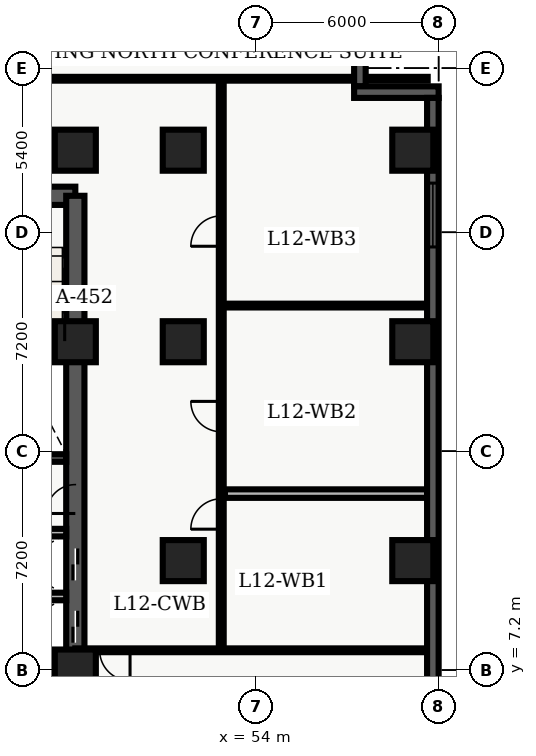
"""IFC4 building model, lengths in metres.
Left out: names, types, materials, properties, quantities, classifications, styles, units other than length and angle.
Written with IfcOpenShell. Run it as: python <this file> out.ifc"""

import sys

from ifc_helpers import new_model, entity, si_unit, converted_unit, direction, frame, origin_with_axes, origin_2d_with_axis, place, context, subcontext, project, spatial, polyline, rectangle, outline, extrude, element, fill, save


model = new_model("IFC4")
c1 = context("Model", 3, precision=1e-05, world=origin_with_axes(), true_north=direction((0.0, 1.0)))
c2 = subcontext(c1, "Body", "Model", "MODEL_VIEW")
j1 = project(units=[si_unit("LENGTHUNIT", "METRE"), converted_unit("PLANEANGLEUNIT", "DEGREE", entity("IfcPlaneAngleMeasure", 0.017), si_unit("PLANEANGLEUNIT", "RADIAN"), dimensions=[0, 0, 0, 0, 0, 0, 0])], contexts=[c1])
p1 = place(None, origin_with_axes())
s1 = spatial("IfcSite", under=j1, at=p1, CompositionType="ELEMENT")
p2 = place(p1, origin_with_axes())
s2 = spatial("IfcBuilding", under=s1, at=p2, CompositionType="ELEMENT")
p3 = place(p2, frame((0.0, 0.0, 52.2), z_axis=(0.0, 0.0, 1.0), x_axis=(1.0, 0.0, 0.0)))
s3 = spatial("IfcBuildingStorey", under=s2, at=p3, CompositionType="ELEMENT", Elevation=52.2)
p4 = place(p3, frame((40.2, 7.2, 0.0), z_axis=(0.0, 0.0, 1.0), x_axis=(1.0, 0.0, 0.0)))
e1 = element("IfcWall", 1, at=p4, inside=s3, PredefinedType="SHEAR", context=c2, shape_type="SweptSolid", body=[
    extrude(outline(polyline([(0.0, -0.3), (7.85, -0.3), (7.85, 0.3), (0.0, 0.3), (0.0, -0.3)])), origin_with_axes(), (0.0, 0.0, 1.0), 3.66),
])
p5 = place(p4, frame((2.175, 0.0, 0.0), z_axis=(0.0, 0.0, 1.0), x_axis=(1.0, 0.0, 0.0)))
e2 = element("IfcOpeningElement", 2, at=p5, cuts=e1, PredefinedType="OPENING", context=c2, shape_type="SweptSolid", body=[
    extrude(rectangle(XDim=1.05, YDim=0.62, at=origin_2d_with_axis()), origin_with_axes(), (0.0, 0.0, 1.0), 2.15),
])
p6 = place(p3, frame((40.2, 22.8, 0.0), z_axis=(0.0, 0.0, 1.0), x_axis=(1.0, 0.0, 0.0)))
e3 = element("IfcWall", 3, at=p6, inside=s3, PredefinedType="SHEAR", context=c2, shape_type="SweptSolid", body=[
    extrude(outline(polyline([(0.0, -0.3), (7.85, -0.3), (7.85, 0.3), (0.0, 0.3), (0.0, -0.3)])), origin_with_axes(), (0.0, 0.0, 1.0), 3.66),
])
p7 = place(p6, frame((5.775, 0.0, 0.0), z_axis=(0.0, 0.0, 1.0), x_axis=(1.0, 0.0, 0.0)))
e4 = element("IfcOpeningElement", 4, at=p7, cuts=e3, PredefinedType="OPENING", context=c2, shape_type="SweptSolid", body=[
    extrude(rectangle(XDim=1.05, YDim=0.62, at=origin_2d_with_axis()), origin_with_axes(), (0.0, 0.0, 1.0), 2.15),
])
p8 = place(p6, frame((2.15, 0.0, 0.0), z_axis=(0.0, 0.0, 1.0), x_axis=(1.0, 0.0, 0.0)))
e5 = element("IfcOpeningElement", 5, at=p8, cuts=e3, PredefinedType="OPENING", context=c2, shape_type="SweptSolid", body=[
    extrude(rectangle(XDim=0.9, YDim=0.62, at=origin_2d_with_axis()), origin_with_axes(), (0.0, 0.0, 1.0), 2.15),
])
p9 = place(p3, frame((48.05, 7.2, 0.0), z_axis=(0.0, 0.0, 1.0), x_axis=(0.0, 1.0, 0.0)))
e6 = element("IfcWall", 6, at=p9, inside=s3, PredefinedType="SHEAR", context=c2, shape_type="SweptSolid", body=[
    extrude(outline(polyline([(0.0, -0.3), (15.6, -0.3), (15.6, 0.3), (0.0, 0.3), (0.0, -0.3)])), origin_with_axes(), (0.0, 0.0, 1.0), 3.66),
])
p10 = place(p9, frame((1.425, 0.0, 0.0), z_axis=(0.0, 0.0, 1.0), x_axis=(1.0, 0.0, 0.0)))
e7 = element("IfcOpeningElement", 7, at=p10, cuts=e6, PredefinedType="OPENING", context=c2, shape_type="SweptSolid", body=[
    extrude(rectangle(XDim=1.05, YDim=0.62, at=origin_2d_with_axis()), origin_with_axes(), (0.0, 0.0, 1.0), 2.15),
])
p11 = place(p9, frame((3.475, 0.0, 0.0), z_axis=(0.0, 0.0, 1.0), x_axis=(1.0, 0.0, 0.0)))
e8 = element("IfcOpeningElement", 8, at=p11, cuts=e6, PredefinedType="OPENING", context=c2, shape_type="SweptSolid", body=[
    extrude(rectangle(XDim=1.05, YDim=0.62, at=origin_2d_with_axis()), origin_with_axes(), (0.0, 0.0, 1.0), 2.15),
])
p12 = place(p9, frame((5.625, 0.0, 0.0), z_axis=(0.0, 0.0, 1.0), x_axis=(1.0, 0.0, 0.0)))
e9 = element("IfcOpeningElement", 9, at=p12, cuts=e6, PredefinedType="OPENING", context=c2, shape_type="SweptSolid", body=[
    extrude(rectangle(XDim=0.95, YDim=0.62, at=origin_2d_with_axis()), origin_with_axes(), (0.0, 0.0, 1.0), 2.15),
])
p13 = place(p3, frame((44.25, 14.175, 0.0), z_axis=(0.0, 0.0, 1.0), x_axis=(1.0, 0.0, 0.0)))
e10 = element("IfcWall", 10, at=p13, inside=s3, PredefinedType="SHEAR", context=c2, shape_type="SweptSolid", body=[
    extrude(outline(polyline([(0.0, -0.125), (3.5, -0.125), (3.5, 0.125), (0.0, 0.125), (0.0, -0.125)])), origin_with_axes(), (0.0, 0.0, 1.0), 3.66),
])
for number, where, z_axis, x_axis in (
    (11, (48.05, 7.2, 0.0), (0.0, 0.0, 1.0), (1.0, 0.0, 0.0)),
    (12, (48.05, 18.0, 0.0), (0.0, 0.0, 1.0), (1.0, 0.0, 0.0)),
    (13, (48.05, 24.3, 0.0), (0.0, 0.0, 1.0), (1.0, 0.0, 0.0)),
    (14, (51.6, 10.8, 0.0), (0.0, 0.0, 1.0), (1.0, 0.0, 0.0)),
    (15, (51.6, 18.0, 0.0), (0.0, 0.0, 1.0), (1.0, 0.0, 0.0)),
    (16, (51.6, 24.3, 0.0), (0.0, 0.0, 1.0), (1.0, 0.0, 0.0)),
    (17, (59.15, 10.8, 0.0), (0.0, 0.0, 1.0), (1.0, 0.0, 0.0)),
    (18, (59.15, 18.0, 0.0), (0.0, 0.0, 1.0), (1.0, 0.0, 0.0)),
    (19, (59.15, 24.3, 0.0), (0.0, 0.0, 1.0), (1.0, 0.0, 0.0)),
):
    element("IfcColumn", number, at=place(p3, frame(where, z_axis=z_axis, x_axis=x_axis)), inside=s3, PredefinedType="COLUMN", context=c2, shape_type="SweptSolid", body=[
        extrude(rectangle(XDim=1.35, YDim=1.35, at=origin_2d_with_axis()), origin_with_axes(), (0.0, 0.0, 1.0), 3.9),
    ])
for number, where, z_axis, x_axis in (
    (20, (44.25, 9.62, 0.0), (0.0, 0.0, 1.0), (1.0, 0.0, 0.0)),
    (21, (44.25, 11.72, 0.0), (0.0, 0.0, 1.0), (1.0, 0.0, 0.0)),
):
    element("IfcWall", number, at=place(p3, frame(where, z_axis=z_axis, x_axis=x_axis)), inside=s3, PredefinedType="SOLIDWALL", context=c2, shape_type="SweptSolid", body=[
        extrude(outline(polyline([(0.0, -0.125), (3.5, -0.125), (3.5, 0.125), (0.0, 0.125), (0.0, -0.125)])), origin_with_axes(), (0.0, 0.0, 1.0), 2.7),
    ])
p14 = place(p3, frame((52.85, 7.85, 0.0), z_axis=(0.0, 0.0, 1.0), x_axis=(0.0, 1.0, 0.0)))
e22 = element("IfcWall", 22, at=p14, inside=s3, PredefinedType="PARTITIONING", context=c2, shape_type="SweptSolid", body=[
    extrude(outline(polyline([(0.0, -0.08), (18.8, -0.08), (18.8, 0.08), (0.0, 0.08), (0.0, -0.08)])), origin_with_axes(), (0.0, 0.0, 1.0), 2.7),
])
p15 = place(p14, frame((4.484, 0.0, 0.0), z_axis=(0.0, 0.0, 1.0), x_axis=(1.0, 0.0, 0.0)))
e23 = element("IfcOpeningElement", 23, at=p15, cuts=e22, PredefinedType="OPENING", context=c2, shape_type="SweptSolid", body=[
    extrude(rectangle(XDim=1.0, YDim=0.18, at=origin_2d_with_axis()), origin_with_axes(), (0.0, 0.0, 1.0), 2.15),
])
p16 = place(p14, frame((7.687, 0.0, 0.0), z_axis=(0.0, 0.0, 1.0), x_axis=(1.0, 0.0, 0.0)))
e24 = element("IfcOpeningElement", 24, at=p16, cuts=e22, PredefinedType="OPENING", context=c2, shape_type="SweptSolid", body=[
    extrude(rectangle(XDim=1.0, YDim=0.18, at=origin_2d_with_axis()), origin_with_axes(), (0.0, 0.0, 1.0), 2.15),
])
p17 = place(p14, frame((13.79, 0.0, 0.0), z_axis=(0.0, 0.0, 1.0), x_axis=(1.0, 0.0, 0.0)))
e25 = element("IfcOpeningElement", 25, at=p17, cuts=e22, PredefinedType="OPENING", context=c2, shape_type="SweptSolid", body=[
    extrude(rectangle(XDim=1.0, YDim=0.18, at=origin_2d_with_axis()), origin_with_axes(), (0.0, 0.0, 1.0), 2.15),
])
p18 = place(p3, frame((59.64, 7.85, 0.0), z_axis=(0.0, 0.0, 1.0), x_axis=(-1.0, 0.0, 0.0)))
e26 = element("IfcWall", 26, at=p18, inside=s3, PredefinedType="PARTITIONING", context=c2, shape_type="SweptSolid", body=[
    extrude(outline(polyline([(0.0, -0.062), (11.59, -0.062), (11.59, 0.062), (0.0, 0.062), (0.0, -0.062)])), origin_with_axes(), (0.0, 0.0, 1.0), 2.7),
])
p19 = place(p18, frame((10.29, 0.0, 0.0), z_axis=(0.0, 0.0, 1.0), x_axis=(1.0, 0.0, 0.0)))
e27 = element("IfcOpeningElement", 27, at=p19, cuts=e26, PredefinedType="OPENING", context=c2, shape_type="SweptSolid", body=[
    extrude(rectangle(XDim=1.0, YDim=0.145, at=origin_2d_with_axis()), origin_with_axes(), (0.0, 0.0, 1.0), 2.15),
])
p20 = place(p3, frame((38.76, 26.65, 0.0), z_axis=(0.0, 0.0, 1.0), x_axis=(1.0, 0.0, 0.0)))
e28 = element("IfcWall", 28, at=p20, inside=s3, PredefinedType="PARTITIONING", context=c2, shape_type="SweptSolid", body=[
    extrude(outline(polyline([(0.0, -0.062), (20.88, -0.062), (20.88, 0.062), (0.0, 0.062), (0.0, -0.062)])), origin_with_axes(), (0.0, 0.0, 1.0), 2.7),
])
p21 = place(p20, frame((4.24, 0.0, 0.0), z_axis=(0.0, 0.0, 1.0), x_axis=(1.0, 0.0, 0.0)))
e29 = element("IfcOpeningElement", 29, at=p21, cuts=e28, PredefinedType="OPENING", context=c2, shape_type="SweptSolid", body=[
    extrude(rectangle(XDim=1.0, YDim=0.145, at=origin_2d_with_axis()), origin_with_axes(), (0.0, 0.0, 1.0), 2.15),
])
p22 = place(p3, frame((52.97, 13.004, 0.0), z_axis=(0.0, 0.0, 1.0), x_axis=(1.0, 0.0, 0.0)))
e30 = element("IfcWall", 30, at=p22, inside=s3, PredefinedType="PARTITIONING", context=c2, shape_type="SweptSolid", body=[
    extrude(outline(polyline([(0.0, -0.14), (6.655, -0.14), (6.655, 0.14), (0.0, 0.14), (0.0, -0.14)])), origin_with_axes(), (0.0, 0.0, 1.0), 2.7),
])
p23 = place(p3, frame((52.97, 19.189, 0.0), z_axis=(0.0, 0.0, 1.0), x_axis=(1.0, 0.0, 0.0)))
e31 = element("IfcWall", 31, at=p23, inside=s3, PredefinedType="PARTITIONING", context=c2, shape_type="SweptSolid", body=[
    extrude(outline(polyline([(0.0, -0.062), (6.655, -0.062), (6.655, 0.062), (0.0, 0.062), (0.0, -0.062)])), origin_with_axes(), (0.0, 0.0, 1.0), 2.7),
])
p24 = place(p3, frame((57.41, 28.42, 0.0), z_axis=(0.0, 0.0, 1.0), x_axis=(0.0, -1.0, 0.0)))
e32 = element("IfcWall", 32, at=p24, inside=s3, PredefinedType="SOLIDWALL", context=c2, shape_type="SweptSolid", body=[
    extrude(outline(polyline([(0.0, -0.19), (2.02, -0.19), (2.02, 0.19), (0.0, 0.19), (0.0, -0.19)])), origin_with_axes(), (0.0, 0.0, 1.0), 3.66),
])
p25 = place(p3, frame((57.22, 26.21, 0.0), z_axis=(0.0, 0.0, 1.0), x_axis=(1.0, 0.0, 0.0)))
e33 = element("IfcWall", 33, at=p25, inside=s3, PredefinedType="SOLIDWALL", context=c2, shape_type="SweptSolid", body=[
    extrude(outline(polyline([(0.0, -0.19), (2.78, -0.19), (2.78, 0.19), (0.0, 0.19), (0.0, -0.19)])), origin_with_axes(), (0.0, 0.0, 1.0), 3.66),
])
p26 = place(p3, frame((59.81, 26.02, 0.0), z_axis=(0.0, 0.0, 1.0), x_axis=(0.0, -1.0, 0.0)))
e34 = element("IfcWall", 34, at=p26, inside=s3, PredefinedType="SOLIDWALL", context=c2, shape_type="SweptSolid", body=[
    extrude(outline(polyline([(0.0, -0.19), (23.62, -0.19), (23.62, 0.19), (0.0, 0.19), (0.0, -0.19)])), origin_with_axes(), (0.0, 0.0, 1.0), 3.66),
])
p27 = place(p26, frame((3.853, 0.0, 0.45), z_axis=(0.0, 0.0, 1.0), x_axis=(1.0, 0.0, 0.0)))
e35 = element("IfcOpeningElement", 35, at=p27, cuts=e34, PredefinedType="OPENING", context=c2, shape_type="SweptSolid", body=[
    extrude(rectangle(XDim=2.1, YDim=0.4, at=origin_2d_with_axis()), origin_with_axes(), (0.0, 0.0, 1.0), 2.2),
])
p28 = place(p26, frame((20.218, 0.0, 0.45), z_axis=(0.0, 0.0, 1.0), x_axis=(1.0, 0.0, 0.0)))
e36 = element("IfcOpeningElement", 36, at=p28, cuts=e34, PredefinedType="OPENING", context=c2, shape_type="SweptSolid", body=[
    extrude(rectangle(XDim=2.1, YDim=0.4, at=origin_2d_with_axis()), origin_with_axes(), (0.0, 0.0, 1.0), 2.2),
])
p29 = place(p9, frame((1.425, 0.0, 0.0), z_axis=(0.0, 0.0, 1.0), x_axis=(1.0, 0.0, 0.0)))
e37 = element("IfcDoor", 37, at=p29, inside=s3, OperationType="SLIDING_TO_LEFT", PredefinedType="DOOR", context=c2, shape_type="SweptSolid", body=[
    extrude(rectangle(XDim=1.05, YDim=0.09, at=origin_2d_with_axis()), origin_with_axes(), (0.0, 0.0, 1.0), 2.15),
])
fill(e7, e37)
p30 = place(p9, frame((3.475, 0.0, 0.0), z_axis=(0.0, 0.0, 1.0), x_axis=(1.0, 0.0, 0.0)))
e38 = element("IfcDoor", 38, at=p30, inside=s3, OperationType="SLIDING_TO_RIGHT", PredefinedType="DOOR", context=c2, shape_type="SweptSolid", body=[
    extrude(rectangle(XDim=1.05, YDim=0.09, at=origin_2d_with_axis()), origin_with_axes(), (0.0, 0.0, 1.0), 2.15),
])
fill(e8, e38)
p31 = place(p9, frame((5.625, 0.0, 0.0), z_axis=(0.0, 0.0, 1.0), x_axis=(1.0, 0.0, 0.0)))
e39 = element("IfcDoor", 39, at=p31, inside=s3, OperationType="SINGLE_SWING_LEFT", PredefinedType="DOOR", context=c2, shape_type="SweptSolid", body=[
    extrude(rectangle(XDim=0.95, YDim=0.09, at=origin_2d_with_axis()), origin_with_axes(), (0.0, 0.0, 1.0), 2.15),
])
fill(e9, e39)
p32 = place(p18, frame((10.29, 0.0, 0.0), z_axis=(0.0, 0.0, 1.0), x_axis=(1.0, 0.0, 0.0)))
e40 = element("IfcDoor", 40, at=p32, inside=s3, OperationType="SINGLE_SWING_LEFT", PredefinedType="DOOR", context=c2, shape_type="SweptSolid", body=[
    extrude(rectangle(XDim=1.0, YDim=0.075, at=origin_2d_with_axis()), origin_with_axes(), (0.0, 0.0, 1.0), 2.15),
])
fill(e27, e40)
p33 = place(p14, frame((4.484, 0.0, 0.0), z_axis=(0.0, 0.0, 1.0), x_axis=(1.0, 0.0, 0.0)))
e41 = element("IfcDoor", 41, at=p33, inside=s3, OperationType="SINGLE_SWING_LEFT", PredefinedType="DOOR", context=c2, shape_type="SweptSolid", body=[
    extrude(rectangle(XDim=1.0, YDim=0.09, at=origin_2d_with_axis()), origin_with_axes(), (0.0, 0.0, 1.0), 2.15),
])
fill(e23, e41)
p34 = place(p14, frame((7.687, 0.0, 0.0), z_axis=(0.0, 0.0, 1.0), x_axis=(1.0, 0.0, 0.0)))
e42 = element("IfcDoor", 42, at=p34, inside=s3, OperationType="SINGLE_SWING_RIGHT", PredefinedType="DOOR", context=c2, shape_type="SweptSolid", body=[
    extrude(rectangle(XDim=1.0, YDim=0.09, at=origin_2d_with_axis()), origin_with_axes(), (0.0, 0.0, 1.0), 2.15),
])
fill(e24, e42)
p35 = place(p14, frame((13.79, 0.0, 0.0), z_axis=(0.0, 0.0, 1.0), x_axis=(1.0, 0.0, 0.0)))
e43 = element("IfcDoor", 43, at=p35, inside=s3, OperationType="SINGLE_SWING_LEFT", PredefinedType="DOOR", context=c2, shape_type="SweptSolid", body=[
    extrude(rectangle(XDim=1.0, YDim=0.09, at=origin_2d_with_axis()), origin_with_axes(), (0.0, 0.0, 1.0), 2.15),
])
fill(e25, e43)
p36 = place(p26, frame((3.853, 0.0, 0.45), z_axis=(0.0, 0.0, 1.0), x_axis=(1.0, 0.0, 0.0)))
e44 = element("IfcWindow", 44, at=p36, inside=s3, PredefinedType="WINDOW", context=c2, shape_type="SweptSolid", body=[
    extrude(rectangle(XDim=2.1, YDim=0.09, at=origin_2d_with_axis()), origin_with_axes(), (0.0, 0.0, 1.0), 2.2),
])
fill(e35, e44)
save(model, sys.argv[1])
